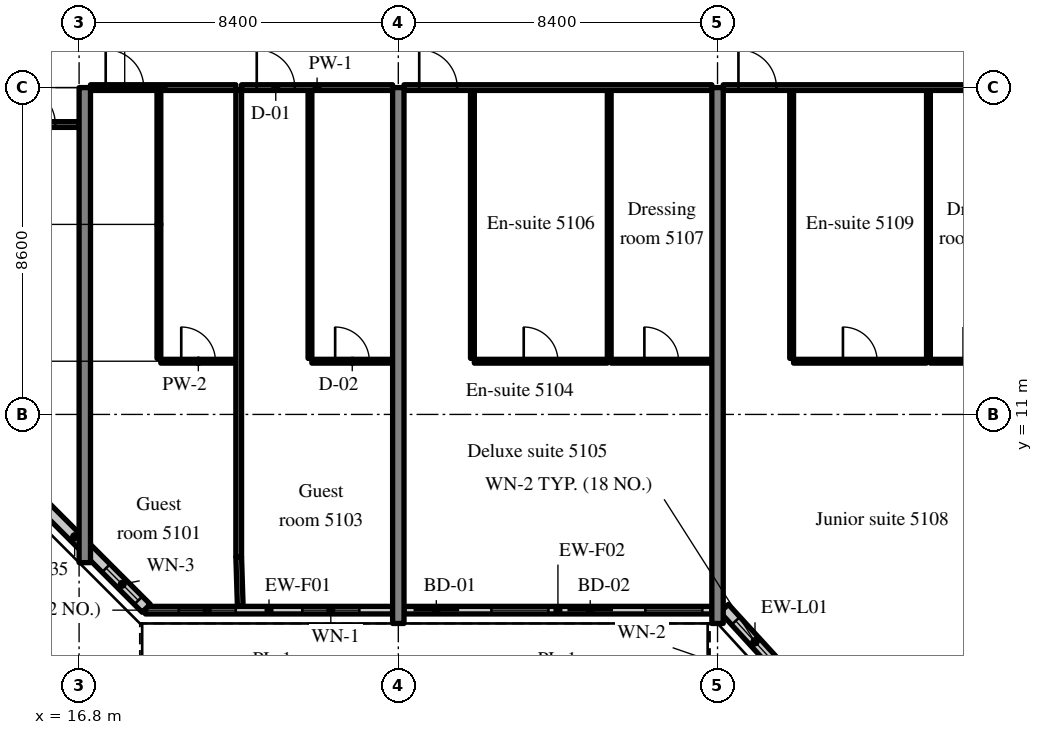
"""IFC4 building model, lengths in metres.
Left out: names, types, materials, properties, quantities, classifications, styles, units other than length and angle.
Written with IfcOpenShell. Run it as: python <this file> out.ifc"""

import sys

from ifc_helpers import new_model, si_unit, direction, frame, frame_2d, origin, place, context, subcontext, project, spatial, rectangle, extrude, source, transform, mapped, element, fill, save


model = new_model("IFC4")
c1 = context("Model", 3, precision=1e-05, world=origin(), true_north=direction((0.0, 1.0)))
c2 = subcontext(c1, "Body", "Model", "MODEL_VIEW")
j1 = project(units=[si_unit("LENGTHUNIT", "METRE"), si_unit("PLANEANGLEUNIT", "RADIAN")], contexts=[c1])
p1 = place(None, origin())
s1 = spatial("IfcSite", under=j1, at=p1, CompositionType="ELEMENT")
p2 = place(p1, origin())
s2 = spatial("IfcBuilding", under=s1, at=p2, CompositionType="ELEMENT")
p3 = place(p2, frame((0.0, 0.0, 214.0)))
s3 = spatial("IfcBuildingStorey", under=s2, at=p3, CompositionType="ELEMENT", Elevation=214.0)
m1 = source(origin(), c2, "Body", "SweptSolid", [
    extrude(rectangle(XDim=12.5, YDim=0.3, at=frame_2d((6.25, 0.0))), origin(), (0.0, 0.0, 1.0), 3.62),
])
p4 = place(p3, frame((16.95, 7.1, 0.0), z_axis=(0.0, 0.0, 1.0), x_axis=(0.0, 1.0, 0.0)))
e1 = element("IfcWall", 1, at=p4, inside=s3, PredefinedType="SHEAR", context=c2, shape_type="MappedRepresentation", body=[
    mapped(m1, transform((0.0, 0.0, 0.0), scale=1.0)),
])
m2 = source(origin(), c2, "Body", "SweptSolid", [
    extrude(rectangle(XDim=14.1, YDim=0.3, at=frame_2d((7.05, 0.0))), origin(), (0.0, 0.0, 1.0), 3.62),
])
for number, where, z_axis, x_axis in (
    (2, (25.2, 5.5, 0.0), (0.0, 0.0, 1.0), (0.0, 1.0, 0.0)),
    (3, (33.6, 5.5, 0.0), (0.0, 0.0, 1.0), (0.0, 1.0, 0.0)),
):
    element("IfcWall", number, at=place(p3, frame(where, z_axis=z_axis, x_axis=x_axis)), inside=s3, PredefinedType="SHEAR", context=c2, shape_type="MappedRepresentation", body=[
        mapped(m2, transform((0.0, 0.0, 0.0), scale=1.0)),
    ])
m3 = source(origin(), c2, "Body", "SweptSolid", [
    extrude(rectangle(XDim=6.505, YDim=0.2, at=frame_2d((3.252, 0.0))), origin(), (0.0, 0.0, 1.0), 3.02),
])
p5 = place(p3, frame((18.545, 5.85, 0.0), z_axis=(0.0, 0.0, 1.0), x_axis=(1.0, 0.0, 0.0)))
e4 = element("IfcWall", 4, at=p5, inside=s3, PredefinedType="SOLIDWALL", context=c2, shape_type="MappedRepresentation", body=[
    mapped(m3, transform((0.0, 0.0, 0.0), scale=1.0)),
])
m4 = source(origin(), c2, "Body", "SweptSolid", [
    extrude(rectangle(XDim=1.5, YDim=1.5, at=frame_2d((0.75, 0.75))), frame((0.0, 0.11, 0.0), z_axis=(0.0, -1.0, 0.0), x_axis=(1.0, 0.0, 0.0)), (0.0, 0.0, 1.0), 0.22),
])
p6 = place(p5, frame((0.876, 0.0, 0.9)))
e5 = element("IfcOpeningElement", 5, at=p6, cuts=e4, PredefinedType="OPENING", context=c2, shape_type="MappedRepresentation", body=[
    mapped(m4, transform((0.0, 0.0, 0.0), scale=1.0)),
])
p7 = place(p5, frame((4.129, 0.0, 0.9)))
e6 = element("IfcOpeningElement", 6, at=p7, cuts=e4, PredefinedType="OPENING", context=c2, shape_type="MappedRepresentation", body=[
    mapped(m4, transform((0.0, 0.0, 0.0), scale=1.0)),
])
m5 = source(origin(), c2, "Body", "SweptSolid", [
    extrude(rectangle(XDim=8.1, YDim=0.2, at=frame_2d((4.05, 0.0))), origin(), (0.0, 0.0, 1.0), 3.02),
])
p8 = place(p3, frame((25.35, 5.85, 0.0), z_axis=(0.0, 0.0, 1.0), x_axis=(1.0, 0.0, 0.0)))
e7 = element("IfcWall", 7, at=p8, inside=s3, PredefinedType="SOLIDWALL", context=c2, shape_type="MappedRepresentation", body=[
    mapped(m5, transform((0.0, 0.0, 0.0), scale=1.0)),
])
m6 = source(origin(), c2, "Body", "SweptSolid", [
    extrude(rectangle(XDim=1.2, YDim=2.4, at=frame_2d((0.6, 1.2))), frame((0.0, 0.11, 0.0), z_axis=(0.0, -1.0, 0.0), x_axis=(1.0, 0.0, 0.0)), (0.0, 0.0, 1.0), 0.22),
])
p9 = place(p8, frame((0.25, 0.0, 0.0)))
e8 = element("IfcOpeningElement", 8, at=p9, cuts=e7, PredefinedType="OPENING", context=c2, shape_type="MappedRepresentation", body=[
    mapped(m6, transform((0.0, 0.0, 0.0), scale=1.0)),
])
p10 = place(p8, frame((2.3, 0.0, 0.9)))
e9 = element("IfcOpeningElement", 9, at=p10, cuts=e7, PredefinedType="OPENING", context=c2, shape_type="MappedRepresentation", body=[
    mapped(m4, transform((0.0, 0.0, 0.0), scale=1.0)),
])
p11 = place(p8, frame((4.3, 0.0, 0.0)))
e10 = element("IfcOpeningElement", 10, at=p11, cuts=e7, PredefinedType="OPENING", context=c2, shape_type="MappedRepresentation", body=[
    mapped(m6, transform((0.0, 0.0, 0.0), scale=1.0)),
])
p12 = place(p8, frame((6.35, 0.0, 0.9)))
e11 = element("IfcOpeningElement", 11, at=p12, cuts=e7, PredefinedType="OPENING", context=c2, shape_type="MappedRepresentation", body=[
    mapped(m4, transform((0.0, 0.0, 0.0), scale=1.0)),
])
m7 = source(origin(), c2, "Body", "SweptSolid", [
    extrude(rectangle(XDim=2.398, YDim=0.3, at=frame_2d((1.199, 0.0))), origin(), (0.0, 0.0, 1.0), 3.62),
])
p13 = place(p3, frame((33.776, 5.9, 0.0), z_axis=(0.0, 0.0, 1.0), x_axis=(0.675374189419, -0.737475222815, 0.0)))
e12 = element("IfcWall", 12, at=p13, inside=s3, PredefinedType="SOLIDWALL", context=c2, shape_type="MappedRepresentation", body=[
    mapped(m7, transform((0.0, 0.0, 0.0), scale=1.0)),
])
m8 = source(origin(), c2, "Body", "SweptSolid", [
    extrude(rectangle(XDim=1.5, YDim=2.0, at=frame_2d((0.75, 1.0))), frame((0.0, 0.16, 0.0), z_axis=(0.0, -1.0, 0.0), x_axis=(1.0, 0.0, 0.0)), (0.0, 0.0, 1.0), 0.32),
])
p14 = place(p13, frame((0.449, 0.0, 0.9)))
e13 = element("IfcOpeningElement", 13, at=p14, cuts=e12, PredefinedType="OPENING", context=c2, shape_type="MappedRepresentation", body=[
    mapped(m8, transform((0.0, 0.0, 0.0), scale=1.0)),
])
m9 = source(origin(), c2, "Body", "SweptSolid", [
    extrude(rectangle(XDim=5.326, YDim=0.3, at=frame_2d((2.663, 0.0))), origin(), (0.0, 0.0, 1.0), 3.62),
])
p15 = place(p3, frame((14.8, 9.666, 0.0), z_axis=(0.0, 0.0, 1.0), x_axis=(0.707083859269, -0.707129702361, 0.0)))
e14 = element("IfcWall", 14, at=p15, inside=s3, PredefinedType="SOLIDWALL", context=c2, shape_type="MappedRepresentation", body=[
    mapped(m9, transform((0.0, 0.0, 0.0), scale=1.0)),
])
m10 = source(origin(), c2, "Body", "SweptSolid", [
    extrude(rectangle(XDim=1.2, YDim=1.5, at=frame_2d((0.6, 0.75))), frame((0.0, 0.16, 0.0), z_axis=(0.0, -1.0, 0.0), x_axis=(1.0, 0.0, 0.0)), (0.0, 0.0, 1.0), 0.32),
])
p16 = place(p15, frame((3.833, 0.0, 0.9)))
e15 = element("IfcOpeningElement", 15, at=p16, cuts=e14, PredefinedType="OPENING", context=c2, shape_type="MappedRepresentation", body=[
    mapped(m10, transform((0.0, 0.0, 0.0), scale=1.0)),
])
m11 = source(origin(), c2, "Body", "SweptSolid", [
    extrude(rectangle(XDim=7.05, YDim=0.1, at=frame_2d((3.525, 0.0))), origin(), (0.0, 0.0, 1.0), 3.62),
])
p17 = place(p3, frame((18.9, 12.475, 0.0), z_axis=(0.0, 0.0, 1.0), x_axis=(0.0, 1.0, 0.0)))
e16 = element("IfcWall", 16, at=p17, inside=s3, PredefinedType="PARTITIONING", context=c2, shape_type="MappedRepresentation", body=[
    mapped(m11, transform((0.0, 0.0, 0.0), scale=1.0)),
])
m12 = source(origin(), c2, "Body", "SweptSolid", [
    extrude(rectangle(XDim=1.975, YDim=0.1, at=frame_2d((0.988, 0.0))), origin(), (0.0, 0.0, 1.0), 3.62),
])
p18 = place(p3, frame((18.95, 12.4, 0.0), z_axis=(0.0, 0.0, 1.0), x_axis=(1.0, 0.0, 0.0)))
e17 = element("IfcWall", 17, at=p18, inside=s3, PredefinedType="PARTITIONING", context=c2, shape_type="MappedRepresentation", body=[
    mapped(m12, transform((0.0, 0.0, 0.0), scale=1.0)),
])
m13 = source(origin(), c2, "Body", "SweptSolid", [
    extrude(rectangle(XDim=0.9, YDim=2.1, at=frame_2d((0.45, 1.05))), frame((0.0, 0.06, 0.0), z_axis=(0.0, -1.0, 0.0), x_axis=(1.0, 0.0, 0.0)), (0.0, 0.0, 1.0), 0.12),
])
p19 = place(p18, frame((0.538, 0.0, 0.0)))
e18 = element("IfcOpeningElement", 18, at=p19, cuts=e17, PredefinedType="OPENING", context=c2, shape_type="MappedRepresentation", body=[
    mapped(m13, transform((0.0, 0.0, 0.0), scale=1.0)),
])
m14 = source(origin(), c2, "Body", "SweptSolid", [
    extrude(rectangle(XDim=3.825, YDim=0.15, at=frame_2d((1.913, 0.0))), origin(), (0.0, 0.0, 1.0), 2.92),
])
p20 = place(p3, frame((17.1, 19.6, 0.0), z_axis=(0.0, 0.0, 1.0), x_axis=(1.0, 0.0, 0.0)))
e19 = element("IfcWall", 19, at=p20, inside=s3, PredefinedType="PARTITIONING", context=c2, shape_type="MappedRepresentation", body=[
    mapped(m14, transform((0.0, 0.0, 0.0), scale=1.0)),
])
m15 = source(origin(), c2, "Body", "SweptSolid", [
    extrude(rectangle(XDim=1.0, YDim=2.1, at=frame_2d((0.5, 1.05))), frame((0.0, 0.085, 0.0), z_axis=(0.0, -1.0, 0.0), x_axis=(1.0, 0.0, 0.0)), (0.0, 0.0, 1.0), 0.17),
])
p21 = place(p20, frame((0.4, 0.0, 0.0)))
e20 = element("IfcOpeningElement", 20, at=p21, cuts=e19, PredefinedType="OPENING", context=c2, shape_type="MappedRepresentation", body=[
    mapped(m15, transform((0.0, 0.0, 0.0), scale=1.0)),
])
p22 = place(p3, frame((22.875, 12.475, 0.0), z_axis=(0.0, 0.0, 1.0), x_axis=(0.0, 1.0, 0.0)))
e21 = element("IfcWall", 21, at=p22, inside=s3, PredefinedType="PARTITIONING", context=c2, shape_type="MappedRepresentation", body=[
    mapped(m11, transform((0.0, 0.0, 0.0), scale=1.0)),
])
m16 = source(origin(), c2, "Body", "SweptSolid", [
    extrude(rectangle(XDim=2.125, YDim=0.1, at=frame_2d((1.062, 0.0))), origin(), (0.0, 0.0, 1.0), 3.62),
])
p23 = place(p3, frame((22.925, 12.4, 0.0), z_axis=(0.0, 0.0, 1.0), x_axis=(1.0, 0.0, 0.0)))
e22 = element("IfcWall", 22, at=p23, inside=s3, PredefinedType="PARTITIONING", context=c2, shape_type="MappedRepresentation", body=[
    mapped(m16, transform((0.0, 0.0, 0.0), scale=1.0)),
])
p24 = place(p23, frame((0.613, 0.0, 0.0)))
e23 = element("IfcOpeningElement", 23, at=p24, cuts=e22, PredefinedType="OPENING", context=c2, shape_type="MappedRepresentation", body=[
    mapped(m13, transform((0.0, 0.0, 0.0), scale=1.0)),
])
m17 = source(origin(), c2, "Body", "SweptSolid", [
    extrude(rectangle(XDim=3.975, YDim=0.15, at=frame_2d((1.988, 0.0))), origin(), (0.0, 0.0, 1.0), 2.92),
])
p25 = place(p3, frame((21.075, 19.6, 0.0), z_axis=(0.0, 0.0, 1.0), x_axis=(1.0, 0.0, 0.0)))
e24 = element("IfcWall", 24, at=p25, inside=s3, PredefinedType="PARTITIONING", context=c2, shape_type="MappedRepresentation", body=[
    mapped(m17, transform((0.0, 0.0, 0.0), scale=1.0)),
])
p26 = place(p25, frame((0.4, 0.0, 0.0)))
e25 = element("IfcOpeningElement", 25, at=p26, cuts=e24, PredefinedType="OPENING", context=c2, shape_type="MappedRepresentation", body=[
    mapped(m15, transform((0.0, 0.0, 0.0), scale=1.0)),
])
m18 = source(origin(), c2, "Body", "SweptSolid", [
    extrude(rectangle(XDim=12.275, YDim=0.15, at=frame_2d((6.137, 0.0))), origin(), (0.0, 0.0, 1.0), 3.62),
])
p27 = place(p3, frame((21.0, 7.25, 0.0), z_axis=(0.0, 0.0, 1.0), x_axis=(0.0, 1.0, 0.0)))
e26 = element("IfcWall", 26, at=p27, inside=s3, PredefinedType="PARTITIONING", context=c2, shape_type="MappedRepresentation", body=[
    mapped(m18, transform((0.0, 0.0, 0.0), scale=1.0)),
])
for number, where, z_axis, x_axis in (
    (27, (27.15, 12.475, 0.0), (0.0, 0.0, 1.0), (0.0, 1.0, 0.0)),
    (28, (30.75, 12.475, 0.0), (0.0, 0.0, 1.0), (0.0, 1.0, 0.0)),
):
    element("IfcWall", number, at=place(p3, frame(where, z_axis=z_axis, x_axis=x_axis)), inside=s3, PredefinedType="PARTITIONING", context=c2, shape_type="MappedRepresentation", body=[
        mapped(m11, transform((0.0, 0.0, 0.0), scale=1.0)),
    ])
m19 = source(origin(), c2, "Body", "SweptSolid", [
    extrude(rectangle(XDim=3.5, YDim=0.1, at=frame_2d((1.75, 0.0))), origin(), (0.0, 0.0, 1.0), 3.62),
])
p28 = place(p3, frame((27.2, 12.4, 0.0), z_axis=(0.0, 0.0, 1.0), x_axis=(1.0, 0.0, 0.0)))
e29 = element("IfcWall", 29, at=p28, inside=s3, PredefinedType="PARTITIONING", context=c2, shape_type="MappedRepresentation", body=[
    mapped(m19, transform((0.0, 0.0, 0.0), scale=1.0)),
])
p29 = place(p28, frame((1.3, 0.0, 0.0)))
e30 = element("IfcOpeningElement", 30, at=p29, cuts=e29, PredefinedType="OPENING", context=c2, shape_type="MappedRepresentation", body=[
    mapped(m13, transform((0.0, 0.0, 0.0), scale=1.0)),
])
m20 = source(origin(), c2, "Body", "SweptSolid", [
    extrude(rectangle(XDim=2.65, YDim=0.1, at=frame_2d((1.325, 0.0))), origin(), (0.0, 0.0, 1.0), 3.62),
])
p30 = place(p3, frame((30.8, 12.4, 0.0), z_axis=(0.0, 0.0, 1.0), x_axis=(1.0, 0.0, 0.0)))
e31 = element("IfcWall", 31, at=p30, inside=s3, PredefinedType="PARTITIONING", context=c2, shape_type="MappedRepresentation", body=[
    mapped(m20, transform((0.0, 0.0, 0.0), scale=1.0)),
])
p31 = place(p30, frame((0.875, 0.0, 0.0)))
e32 = element("IfcOpeningElement", 32, at=p31, cuts=e31, PredefinedType="OPENING", context=c2, shape_type="MappedRepresentation", body=[
    mapped(m13, transform((0.0, 0.0, 0.0), scale=1.0)),
])
m21 = source(origin(), c2, "Body", "SweptSolid", [
    extrude(rectangle(XDim=8.1, YDim=0.15, at=frame_2d((4.05, 0.0))), origin(), (0.0, 0.0, 1.0), 2.92),
])
p32 = place(p3, frame((25.35, 19.6, 0.0), z_axis=(0.0, 0.0, 1.0), x_axis=(1.0, 0.0, 0.0)))
e33 = element("IfcWall", 33, at=p32, inside=s3, PredefinedType="PARTITIONING", context=c2, shape_type="MappedRepresentation", body=[
    mapped(m21, transform((0.0, 0.0, 0.0), scale=1.0)),
])
p33 = place(p32, frame((0.4, 0.0, 0.0)))
e34 = element("IfcOpeningElement", 34, at=p33, cuts=e33, PredefinedType="OPENING", context=c2, shape_type="MappedRepresentation", body=[
    mapped(m15, transform((0.0, 0.0, 0.0), scale=1.0)),
])
for number, where, z_axis, x_axis in (
    (35, (35.55, 12.475, 0.0), (0.0, 0.0, 1.0), (0.0, 1.0, 0.0)),
    (36, (39.15, 12.475, 0.0), (0.0, 0.0, 1.0), (0.0, 1.0, 0.0)),
):
    element("IfcWall", number, at=place(p3, frame(where, z_axis=z_axis, x_axis=x_axis)), inside=s3, PredefinedType="PARTITIONING", context=c2, shape_type="MappedRepresentation", body=[
        mapped(m11, transform((0.0, 0.0, 0.0), scale=1.0)),
    ])
p34 = place(p3, frame((35.6, 12.4, 0.0), z_axis=(0.0, 0.0, 1.0), x_axis=(1.0, 0.0, 0.0)))
e37 = element("IfcWall", 37, at=p34, inside=s3, PredefinedType="PARTITIONING", context=c2, shape_type="MappedRepresentation", body=[
    mapped(m19, transform((0.0, 0.0, 0.0), scale=1.0)),
])
p35 = place(p34, frame((1.3, 0.0, 0.0)))
e38 = element("IfcOpeningElement", 38, at=p35, cuts=e37, PredefinedType="OPENING", context=c2, shape_type="MappedRepresentation", body=[
    mapped(m13, transform((0.0, 0.0, 0.0), scale=1.0)),
])
m22 = source(origin(), c2, "Body", "SweptSolid", [
    extrude(rectangle(XDim=2.65, YDim=0.1, at=frame_2d((1.325, 0.0))), origin(), (0.0, 0.0, 1.0), 3.62),
])
p36 = place(p3, frame((39.2, 12.4, 0.0), z_axis=(0.0, 0.0, 1.0), x_axis=(1.0, 0.0, 0.0)))
e39 = element("IfcWall", 39, at=p36, inside=s3, PredefinedType="PARTITIONING", context=c2, shape_type="MappedRepresentation", body=[
    mapped(m22, transform((0.0, 0.0, 0.0), scale=1.0)),
])
p37 = place(p36, frame((0.875, 0.0, 0.0)))
e40 = element("IfcOpeningElement", 40, at=p37, cuts=e39, PredefinedType="OPENING", context=c2, shape_type="MappedRepresentation", body=[
    mapped(m13, transform((0.0, 0.0, 0.0), scale=1.0)),
])
m23 = source(origin(), c2, "Body", "SweptSolid", [
    extrude(rectangle(XDim=8.1, YDim=0.15, at=frame_2d((4.05, 0.0))), origin(), (0.0, 0.0, 1.0), 2.92),
])
p38 = place(p3, frame((33.75, 19.6, 0.0), z_axis=(0.0, 0.0, 1.0), x_axis=(1.0, 0.0, 0.0)))
e41 = element("IfcWall", 41, at=p38, inside=s3, PredefinedType="PARTITIONING", context=c2, shape_type="MappedRepresentation", body=[
    mapped(m23, transform((0.0, 0.0, 0.0), scale=1.0)),
])
p39 = place(p38, frame((0.4, 0.0, 0.0)))
e42 = element("IfcOpeningElement", 42, at=p39, cuts=e41, PredefinedType="OPENING", context=c2, shape_type="MappedRepresentation", body=[
    mapped(m15, transform((0.0, 0.0, 0.0), scale=1.0)),
])
m24 = source(origin(), c2, "Body", "SweptSolid", [
    extrude(rectangle(XDim=1.9, YDim=0.15, at=frame_2d((0.95, 0.0))), origin(), (0.0, 0.0, 1.0), 2.92),
])
p40 = place(p3, frame((14.9, 18.628, 0.0), z_axis=(0.0, 0.0, 1.0), x_axis=(1.0, 0.0, 0.0)))
e43 = element("IfcWall", 43, at=p40, inside=s3, PredefinedType="PARTITIONING", context=c2, shape_type="MappedRepresentation", body=[
    mapped(m24, transform((0.0, 0.0, 0.0), scale=1.0)),
])
p41 = place(p40, frame((0.275, 0.0, 0.0)))
e44 = element("IfcOpeningElement", 44, at=p41, cuts=e43, PredefinedType="OPENING", context=c2, shape_type="MappedRepresentation", body=[
    mapped(m15, transform((0.0, 0.0, 0.0), scale=1.0)),
])
m25 = source(origin(), c2, "Body", "SweptSolid", [
    extrude(rectangle(XDim=1.301, YDim=0.15, at=frame_2d((0.65, 0.0))), origin(), (0.0, 0.0, 1.0), 3.62),
])
p42 = place(p3, frame((21.041, 5.95, 0.0), z_axis=(0.0, 0.0, 1.0), x_axis=(-0.031533606063, 0.999502692187, 0.0)))
e45 = element("IfcWall", 45, at=p42, inside=s3, PredefinedType="PARTITIONING", context=c2, shape_type="MappedRepresentation", body=[
    mapped(m25, transform((0.0, 0.0, 0.0), scale=1.0)),
])
m26 = source(origin(), c2, "Body", "SweptSolid", [
    extrude(rectangle(XDim=1.5, YDim=1.5, at=frame_2d((0.75, 0.75))), frame((0.0, 0.03, 0.0), z_axis=(0.0, -1.0, 0.0), x_axis=(1.0, 0.0, 0.0)), (0.0, 0.0, 1.0), 0.06),
])
p43 = place(p6, origin())
e46 = element("IfcWindow", 46, at=p43, inside=s3, PartitioningType="SINGLE_PANEL", PredefinedType="WINDOW", context=c2, shape_type="MappedRepresentation", body=[
    mapped(m26, transform((0.0, 0.0, 0.0), scale=1.0)),
])
fill(e5, e46)
p44 = place(p7, origin())
e47 = element("IfcWindow", 47, at=p44, inside=s3, PartitioningType="SINGLE_PANEL", PredefinedType="WINDOW", context=c2, shape_type="MappedRepresentation", body=[
    mapped(m26, transform((0.0, 0.0, 0.0), scale=1.0)),
])
fill(e6, e47)
m27 = source(origin(), c2, "Body", "SweptSolid", [
    extrude(rectangle(XDim=1.2, YDim=2.4, at=frame_2d((0.6, 1.2))), frame((0.0, 0.025, 0.0), z_axis=(0.0, -1.0, 0.0), x_axis=(1.0, 0.0, 0.0)), (0.0, 0.0, 1.0), 0.05),
])
p45 = place(p9, origin())
e48 = element("IfcDoor", 48, at=p45, inside=s3, OperationType="SLIDING_TO_LEFT", PredefinedType="DOOR", context=c2, shape_type="MappedRepresentation", body=[
    mapped(m27, transform((0.0, 0.0, 0.0), scale=1.0)),
])
fill(e8, e48)
p46 = place(p10, origin())
e49 = element("IfcWindow", 49, at=p46, inside=s3, PartitioningType="SINGLE_PANEL", PredefinedType="WINDOW", context=c2, shape_type="MappedRepresentation", body=[
    mapped(m26, transform((0.0, 0.0, 0.0), scale=1.0)),
])
fill(e9, e49)
p47 = place(p11, origin())
e50 = element("IfcDoor", 50, at=p47, inside=s3, OperationType="SLIDING_TO_RIGHT", PredefinedType="DOOR", context=c2, shape_type="MappedRepresentation", body=[
    mapped(m27, transform((0.0, 0.0, 0.0), scale=1.0)),
])
fill(e10, e50)
p48 = place(p12, origin())
e51 = element("IfcWindow", 51, at=p48, inside=s3, PartitioningType="SINGLE_PANEL", PredefinedType="WINDOW", context=c2, shape_type="MappedRepresentation", body=[
    mapped(m26, transform((0.0, 0.0, 0.0), scale=1.0)),
])
fill(e11, e51)
m28 = source(origin(), c2, "Body", "SweptSolid", [
    extrude(rectangle(XDim=1.5, YDim=2.0, at=frame_2d((0.75, 1.0))), frame((0.0, 0.03, 0.0), z_axis=(0.0, -1.0, 0.0), x_axis=(1.0, 0.0, 0.0)), (0.0, 0.0, 1.0), 0.06),
])
p49 = place(p14, origin())
e52 = element("IfcWindow", 52, at=p49, inside=s3, PartitioningType="SINGLE_PANEL", PredefinedType="WINDOW", context=c2, shape_type="MappedRepresentation", body=[
    mapped(m28, transform((0.0, 0.0, 0.0), scale=1.0)),
])
fill(e13, e52)
m29 = source(origin(), c2, "Body", "SweptSolid", [
    extrude(rectangle(XDim=1.2, YDim=1.5, at=frame_2d((0.6, 0.75))), frame((0.0, 0.03, 0.0), z_axis=(0.0, -1.0, 0.0), x_axis=(1.0, 0.0, 0.0)), (0.0, 0.0, 1.0), 0.06),
])
p50 = place(p16, origin())
e53 = element("IfcWindow", 53, at=p50, inside=s3, PartitioningType="SINGLE_PANEL", PredefinedType="WINDOW", context=c2, shape_type="MappedRepresentation", body=[
    mapped(m29, transform((0.0, 0.0, 0.0), scale=1.0)),
])
fill(e15, e53)
m30 = source(origin(), c2, "Body", "SweptSolid", [
    extrude(rectangle(XDim=0.9, YDim=2.1, at=frame_2d((0.45, 1.05))), frame((0.0, 0.025, 0.0), z_axis=(0.0, -1.0, 0.0), x_axis=(1.0, 0.0, 0.0)), (0.0, 0.0, 1.0), 0.05),
])
p51 = place(p19, origin())
e54 = element("IfcDoor", 54, at=p51, inside=s3, OperationType="SINGLE_SWING_LEFT", PredefinedType="DOOR", context=c2, shape_type="MappedRepresentation", body=[
    mapped(m30, transform((0.0, 0.0, 0.0), scale=1.0)),
])
fill(e18, e54)
m31 = source(origin(), c2, "Body", "SweptSolid", [
    extrude(rectangle(XDim=1.0, YDim=2.1, at=frame_2d((0.5, 1.05))), frame((0.0, 0.025, 0.0), z_axis=(0.0, -1.0, 0.0), x_axis=(1.0, 0.0, 0.0)), (0.0, 0.0, 1.0), 0.05),
])
p52 = place(p21, origin())
e55 = element("IfcDoor", 55, at=p52, inside=s3, OperationType="SINGLE_SWING_LEFT", PredefinedType="DOOR", context=c2, shape_type="MappedRepresentation", body=[
    mapped(m31, transform((0.0, 0.0, 0.0), scale=1.0)),
])
fill(e20, e55)
p53 = place(p24, origin())
e56 = element("IfcDoor", 56, at=p53, inside=s3, OperationType="SINGLE_SWING_LEFT", PredefinedType="DOOR", context=c2, shape_type="MappedRepresentation", body=[
    mapped(m30, transform((0.0, 0.0, 0.0), scale=1.0)),
])
fill(e23, e56)
p54 = place(p26, origin())
e57 = element("IfcDoor", 57, at=p54, inside=s3, OperationType="SINGLE_SWING_LEFT", PredefinedType="DOOR", context=c2, shape_type="MappedRepresentation", body=[
    mapped(m31, transform((0.0, 0.0, 0.0), scale=1.0)),
])
fill(e25, e57)
p55 = place(p29, origin())
e58 = element("IfcDoor", 58, at=p55, inside=s3, OperationType="SINGLE_SWING_LEFT", PredefinedType="DOOR", context=c2, shape_type="MappedRepresentation", body=[
    mapped(m30, transform((0.0, 0.0, 0.0), scale=1.0)),
])
fill(e30, e58)
p56 = place(p31, origin())
e59 = element("IfcDoor", 59, at=p56, inside=s3, OperationType="SINGLE_SWING_LEFT", PredefinedType="DOOR", context=c2, shape_type="MappedRepresentation", body=[
    mapped(m30, transform((0.0, 0.0, 0.0), scale=1.0)),
])
fill(e32, e59)
p57 = place(p33, origin())
e60 = element("IfcDoor", 60, at=p57, inside=s3, OperationType="SINGLE_SWING_LEFT", PredefinedType="DOOR", context=c2, shape_type="MappedRepresentation", body=[
    mapped(m31, transform((0.0, 0.0, 0.0), scale=1.0)),
])
fill(e34, e60)
p58 = place(p35, origin())
e61 = element("IfcDoor", 61, at=p58, inside=s3, OperationType="SINGLE_SWING_LEFT", PredefinedType="DOOR", context=c2, shape_type="MappedRepresentation", body=[
    mapped(m30, transform((0.0, 0.0, 0.0), scale=1.0)),
])
fill(e38, e61)
p59 = place(p39, origin())
e62 = element("IfcDoor", 62, at=p59, inside=s3, OperationType="SINGLE_SWING_LEFT", PredefinedType="DOOR", context=c2, shape_type="MappedRepresentation", body=[
    mapped(m31, transform((0.0, 0.0, 0.0), scale=1.0)),
])
fill(e42, e62)
p60 = place(p41, origin())
e63 = element("IfcDoor", 63, at=p60, inside=s3, OperationType="SINGLE_SWING_LEFT", PredefinedType="DOOR", context=c2, shape_type="MappedRepresentation", body=[
    mapped(m31, transform((0.0, 0.0, 0.0), scale=1.0)),
])
fill(e44, e63)
save(model, sys.argv[1])
